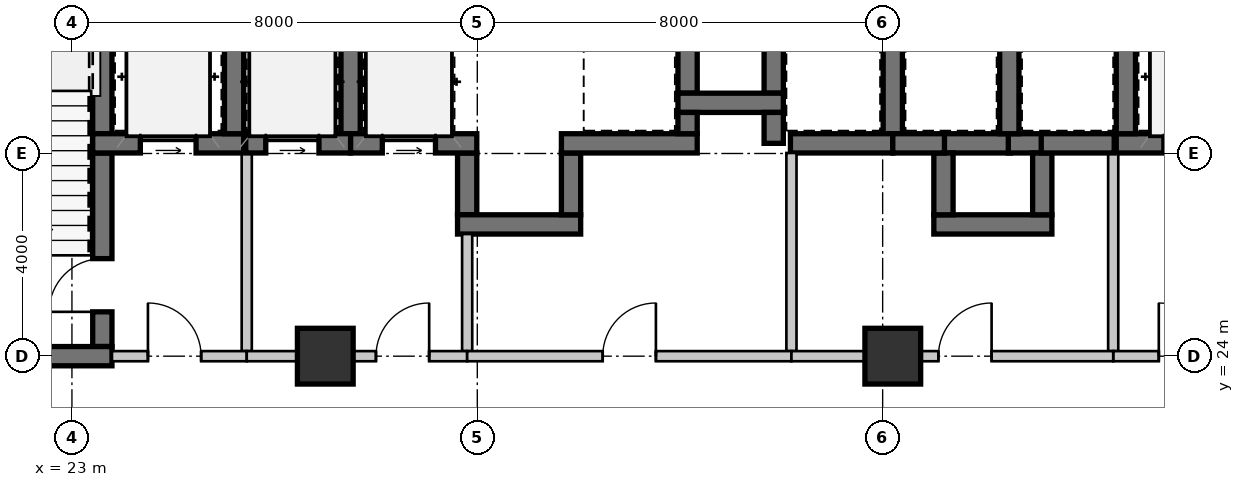
"""IFC4 building model, lengths in metres.
Left out: names, types, materials, properties, quantities, classifications, styles, units other than length and angle.
Written with IfcOpenShell. Run it as: python <this file> out.ifc"""

import sys

from ifc_helpers import new_model, si_unit, direction, frame, frame_2d, origin, origin_2d, place, context, subcontext, project, spatial, rectangle, extrude, source, transform, mapped, element, fill, save


model = new_model("IFC4")
c1 = context("Model", 3, precision=1e-05, world=origin(), true_north=direction((0.0, 1.0)))
c2 = subcontext(c1, "Body", "Model", "MODEL_VIEW")
j1 = project(units=[si_unit("LENGTHUNIT", "METRE"), si_unit("PLANEANGLEUNIT", "RADIAN")], contexts=[c1])
p1 = place(None, origin())
s1 = spatial("IfcSite", under=j1, at=p1, CompositionType="ELEMENT")
p2 = place(p1, origin())
s2 = spatial("IfcBuilding", under=s1, at=p2, CompositionType="ELEMENT")
p3 = place(p2, frame((0.0, 0.0, 4.55)))
s3 = spatial("IfcBuildingStorey", under=s2, at=p3, CompositionType="ELEMENT", Elevation=4.55)
m1 = source(origin(), c2, "Body", "SweptSolid", [
    extrude(rectangle(XDim=1.1, YDim=1.1, at=origin_2d()), origin(), (0.0, 0.0, 1.0), 3.85),
])
for number, where, z_axis, x_axis in (
    (1, (28.0, 24.0, 0.0), (0.0, 0.0, 1.0), (1.0, 0.0, 0.0)),
    (2, (39.2, 24.0, 0.0), (0.0, 0.0, 1.0), (1.0, 0.0, 0.0)),
):
    element("IfcColumn", number, at=place(p3, frame(where, z_axis=z_axis, x_axis=x_axis)), inside=s3, PredefinedType="COLUMN", context=c2, shape_type="MappedRepresentation", body=[
        mapped(m1, transform((0.0, 0.0, 0.0), scale=1.0)),
    ])
m2 = source(origin(), c2, "Body", "SweptSolid", [
    extrude(rectangle(XDim=3.42, YDim=0.38, at=frame_2d((1.71, 0.0))), origin(), (0.0, 0.0, 1.0), 3.59),
])
p4 = place(p3, frame((23.6, 28.39, 0.0), z_axis=(0.0, 0.0, 1.0), x_axis=(0.0, 1.0, 0.0)))
e3 = element("IfcWall", 3, at=p4, inside=s3, PredefinedType="SHEAR", context=c2, shape_type="MappedRepresentation", body=[
    mapped(m2, transform((0.0, 0.0, 0.0), scale=1.0)),
])
m3 = source(origin(), c2, "Body", "SweptSolid", [
    extrude(rectangle(XDim=3.82, YDim=0.38, at=frame_2d((1.91, 0.0))), origin(), (0.0, 0.0, 1.0), 3.59),
])
p5 = place(p3, frame((23.6, 24.19, 0.0), z_axis=(0.0, 0.0, 1.0), x_axis=(0.0, 1.0, 0.0)))
e4 = element("IfcWall", 4, at=p5, inside=s3, PredefinedType="SHEAR", context=c2, shape_type="MappedRepresentation", body=[
    mapped(m3, transform((0.0, 0.0, 0.0), scale=1.0)),
])
m4 = source(origin(), c2, "Body", "SweptSolid", [
    extrude(rectangle(XDim=1.05, YDim=2.1, at=frame_2d((0.525, 1.05))), frame((0.0, 0.2, 0.0), z_axis=(0.0, -1.0, 0.0), x_axis=(1.0, 0.0, 0.0)), (0.0, 0.0, 1.0), 0.4),
])
p6 = place(p5, frame((0.685, 0.0, 0.0)))
e5 = element("IfcOpeningElement", 5, at=p6, cuts=e4, PredefinedType="OPENING", context=c2, shape_type="MappedRepresentation", body=[
    mapped(m4, transform((0.0, 0.0, 0.0), scale=1.0)),
])
m5 = source(origin(), c2, "Body", "SweptSolid", [
    extrude(rectangle(XDim=4.98, YDim=0.38, at=frame_2d((2.49, 0.0))), origin(), (0.0, 0.0, 1.0), 3.59),
])
p7 = place(p3, frame((18.81, 24.0, 0.0), z_axis=(0.0, 0.0, 1.0), x_axis=(1.0, 0.0, 0.0)))
e6 = element("IfcWall", 6, at=p7, inside=s3, PredefinedType="SHEAR", context=c2, shape_type="MappedRepresentation", body=[
    mapped(m5, transform((0.0, 0.0, 0.0), scale=1.0)),
])
m6 = source(origin(), c2, "Body", "SweptSolid", [
    extrude(rectangle(XDim=2.98, YDim=0.38, at=frame_2d((1.49, 0.0))), origin(), (0.0, 0.0, 1.0), 3.59),
])
p8 = place(p3, frame((23.41, 28.2, 0.0), z_axis=(0.0, 0.0, 1.0), x_axis=(1.0, 0.0, 0.0)))
e7 = element("IfcWall", 7, at=p8, inside=s3, PredefinedType="SHEAR", context=c2, shape_type="MappedRepresentation", body=[
    mapped(m6, transform((0.0, 0.0, 0.0), scale=1.0)),
])
m7 = source(origin(), c2, "Body", "SweptSolid", [
    extrude(rectangle(XDim=1.1, YDim=2.15, at=frame_2d((0.55, 1.075))), frame((0.0, 0.2, 0.0), z_axis=(0.0, -1.0, 0.0), x_axis=(1.0, 0.0, 0.0)), (0.0, 0.0, 1.0), 0.4),
])
p9 = place(p8, frame((0.94, 0.0, 0.0)))
e8 = element("IfcOpeningElement", 8, at=p9, cuts=e7, PredefinedType="OPENING", context=c2, shape_type="MappedRepresentation", body=[
    mapped(m7, transform((0.0, 0.0, 0.0), scale=1.0)),
])
p10 = place(p3, frame((26.2, 28.39, 0.0), z_axis=(0.0, 0.0, 1.0), x_axis=(0.0, 1.0, 0.0)))
e9 = element("IfcWall", 9, at=p10, inside=s3, PredefinedType="SHEAR", context=c2, shape_type="MappedRepresentation", body=[
    mapped(m2, transform((0.0, 0.0, 0.0), scale=1.0)),
])
m8 = source(origin(), c2, "Body", "SweptSolid", [
    extrude(rectangle(XDim=3.91, YDim=0.2, at=frame_2d((1.955, 0.0))), origin(), (0.0, 0.0, 1.0), 3.59),
])
p11 = place(p3, frame((26.45, 24.1, 0.0), z_axis=(0.0, 0.0, 1.0), x_axis=(0.0, 1.0, 0.0)))
e10 = element("IfcWall", 10, at=p11, inside=s3, PredefinedType="SOLIDWALL", context=c2, shape_type="MappedRepresentation", body=[
    mapped(m8, transform((0.0, 0.0, 0.0), scale=1.0)),
])
m9 = source(origin(), c2, "Body", "SweptSolid", [
    extrude(rectangle(XDim=2.66, YDim=0.2, at=frame_2d((1.33, 0.0))), origin(), (0.0, 0.0, 1.0), 3.13),
])
p12 = place(p3, frame((23.79, 24.0, 0.0), z_axis=(0.0, 0.0, 1.0), x_axis=(1.0, 0.0, 0.0)))
e11 = element("IfcWall", 11, at=p12, inside=s3, PredefinedType="SOLIDWALL", context=c2, shape_type="MappedRepresentation", body=[
    mapped(m9, transform((0.0, 0.0, 0.0), scale=1.0)),
])
m10 = source(origin(), c2, "Body", "SweptSolid", [
    extrude(rectangle(XDim=1.05, YDim=2.1, at=frame_2d((0.525, 1.05))), frame((0.0, 0.11, 0.0), z_axis=(0.0, -1.0, 0.0), x_axis=(1.0, 0.0, 0.0)), (0.0, 0.0, 1.0), 0.22),
])
p13 = place(p12, frame((0.71, 0.0, 0.0)))
e12 = element("IfcOpeningElement", 12, at=p13, cuts=e11, PredefinedType="OPENING", context=c2, shape_type="MappedRepresentation", body=[
    mapped(m10, transform((0.0, 0.0, 0.0), scale=1.0)),
])
p14 = place(p3, frame((43.61, 28.2, 0.0), z_axis=(0.0, 0.0, 1.0), x_axis=(1.0, 0.0, 0.0)))
e13 = element("IfcWall", 13, at=p14, inside=s3, PredefinedType="SHEAR", context=c2, shape_type="MappedRepresentation", body=[
    mapped(m6, transform((0.0, 0.0, 0.0), scale=1.0)),
])
p15 = place(p14, frame((0.94, 0.0, 0.0)))
e14 = element("IfcOpeningElement", 14, at=p15, cuts=e13, PredefinedType="OPENING", context=c2, shape_type="MappedRepresentation", body=[
    mapped(m7, transform((0.0, 0.0, 0.0), scale=1.0)),
])
p16 = place(p3, frame((43.8, 31.81, 0.0), z_axis=(0.0, 0.0, 1.0), x_axis=(0.0, -1.0, 0.0)))
e15 = element("IfcWall", 15, at=p16, inside=s3, PredefinedType="SHEAR", context=c2, shape_type="MappedRepresentation", body=[
    mapped(m2, transform((0.0, 0.0, 0.0), scale=1.0)),
])
p17 = place(p3, frame((43.55, 28.01, 0.0), z_axis=(0.0, 0.0, 1.0), x_axis=(0.0, -1.0, 0.0)))
e16 = element("IfcWall", 16, at=p17, inside=s3, PredefinedType="SOLIDWALL", context=c2, shape_type="MappedRepresentation", body=[
    mapped(m8, transform((0.0, 0.0, 0.0), scale=1.0)),
])
m11 = source(origin(), c2, "Body", "SweptSolid", [
    extrude(rectangle(XDim=2.66, YDim=0.2, at=frame_2d((1.33, 0.0))), origin(), (0.0, 0.0, 1.0), 3.057),
])
p18 = place(p3, frame((43.55, 24.0, 0.0), z_axis=(0.0, 0.0, 1.0), x_axis=(1.0, 0.0, 0.0)))
e17 = element("IfcWall", 17, at=p18, inside=s3, PredefinedType="SOLIDWALL", context=c2, shape_type="MappedRepresentation", body=[
    mapped(m11, transform((0.0, 0.0, 0.0), scale=1.0)),
])
p19 = place(p18, frame((0.9, 0.0, 0.0)))
e18 = element("IfcOpeningElement", 18, at=p19, cuts=e17, PredefinedType="OPENING", context=c2, shape_type="MappedRepresentation", body=[
    mapped(m10, transform((0.0, 0.0, 0.0), scale=1.0)),
])
m12 = source(origin(), c2, "Body", "SweptSolid", [
    extrude(rectangle(XDim=1.12, YDim=0.38, at=frame_2d((0.56, 0.0))), origin(), (0.0, 0.0, 1.0), 3.59),
])
for number, where, z_axis, x_axis in (
    (19, (35.15, 30.31, 0.0), (0.0, 0.0, 1.0), (0.0, -1.0, 0.0)),
    (20, (36.85, 29.19, 0.0), (0.0, 0.0, 1.0), (0.0, 1.0, 0.0)),
):
    element("IfcWall", number, at=place(p3, frame(where, z_axis=z_axis, x_axis=x_axis)), inside=s3, PredefinedType="SHEAR", context=c2, shape_type="MappedRepresentation", body=[
        mapped(m12, transform((0.0, 0.0, 0.0), scale=1.0)),
    ])
m13 = source(origin(), c2, "Body", "SweptSolid", [
    extrude(rectangle(XDim=2.08, YDim=0.38, at=frame_2d((1.04, 0.0))), origin(), (0.0, 0.0, 1.0), 3.59),
])
p20 = place(p3, frame((34.96, 29.0, 0.0), z_axis=(0.0, 0.0, 1.0), x_axis=(1.0, 0.0, 0.0)))
e21 = element("IfcWall", 21, at=p20, inside=s3, PredefinedType="SHEAR", context=c2, shape_type="MappedRepresentation", body=[
    mapped(m13, transform((0.0, 0.0, 0.0), scale=1.0)),
])
m14 = source(origin(), c2, "Body", "SweptSolid", [
    extrude(rectangle(XDim=1.22, YDim=0.38, at=frame_2d((0.61, 0.0))), origin(), (0.0, 0.0, 1.0), 3.59),
])
p21 = place(p3, frame((30.8, 28.01, 0.0), z_axis=(0.0, 0.0, 1.0), x_axis=(0.0, -1.0, 0.0)))
e22 = element("IfcWall", 22, at=p21, inside=s3, PredefinedType="SHEAR", context=c2, shape_type="MappedRepresentation", body=[
    mapped(m14, transform((0.0, 0.0, 0.0), scale=1.0)),
])
m15 = source(origin(), c2, "Body", "SweptSolid", [
    extrude(rectangle(XDim=2.43, YDim=0.38, at=frame_2d((1.215, 0.0))), origin(), (0.0, 0.0, 1.0), 3.59),
])
p22 = place(p3, frame((30.61, 26.6, 0.0), z_axis=(0.0, 0.0, 1.0), x_axis=(1.0, 0.0, 0.0)))
e23 = element("IfcWall", 23, at=p22, inside=s3, PredefinedType="SHEAR", context=c2, shape_type="MappedRepresentation", body=[
    mapped(m15, transform((0.0, 0.0, 0.0), scale=1.0)),
])
p23 = place(p3, frame((32.85, 26.79, 0.0), z_axis=(0.0, 0.0, 1.0), x_axis=(0.0, 1.0, 0.0)))
e24 = element("IfcWall", 24, at=p23, inside=s3, PredefinedType="SHEAR", context=c2, shape_type="MappedRepresentation", body=[
    mapped(m14, transform((0.0, 0.0, 0.0), scale=1.0)),
])
m16 = source(origin(), c2, "Body", "SweptSolid", [
    extrude(rectangle(XDim=1.32, YDim=0.38, at=frame_2d((0.66, 0.0))), origin(), (0.0, 0.0, 1.0), 3.59),
])
p24 = place(p3, frame((41.52, 28.2, 0.0), z_axis=(0.0, 0.0, 1.0), x_axis=(-1.0, 0.0, 0.0)))
e25 = element("IfcWall", 25, at=p24, inside=s3, PredefinedType="SHEAR", context=c2, shape_type="MappedRepresentation", body=[
    mapped(m16, transform((0.0, 0.0, 0.0), scale=1.0)),
])
m17 = source(origin(), c2, "Body", "SweptSolid", [
    extrude(rectangle(XDim=0.67, YDim=0.38, at=frame_2d((0.335, 0.0))), origin(), (0.0, 0.0, 1.0), 3.59),
])
p25 = place(p3, frame((42.15, 28.2, 0.0), z_axis=(0.0, 0.0, 1.0), x_axis=(-1.0, 0.0, 0.0)))
e26 = element("IfcWall", 26, at=p25, inside=s3, PredefinedType="SHEAR", context=c2, shape_type="MappedRepresentation", body=[
    mapped(m17, transform((0.0, 0.0, 0.0), scale=1.0)),
])
m18 = source(origin(), c2, "Body", "SweptSolid", [
    extrude(rectangle(XDim=2.33, YDim=0.38, at=frame_2d((1.165, 0.0))), origin(), (0.0, 0.0, 1.0), 3.59),
])
p26 = place(p3, frame((40.01, 26.6, 0.0), z_axis=(0.0, 0.0, 1.0), x_axis=(1.0, 0.0, 0.0)))
e27 = element("IfcWall", 27, at=p26, inside=s3, PredefinedType="SHEAR", context=c2, shape_type="MappedRepresentation", body=[
    mapped(m18, transform((0.0, 0.0, 0.0), scale=1.0)),
])
for number, where, z_axis, x_axis in (
    (28, (40.2, 28.01, 0.0), (0.0, 0.0, 1.0), (0.0, -1.0, 0.0)),
    (29, (42.15, 26.79, 0.0), (0.0, 0.0, 1.0), (0.0, 1.0, 0.0)),
):
    element("IfcWall", number, at=place(p3, frame(where, z_axis=z_axis, x_axis=x_axis)), inside=s3, PredefinedType="SHEAR", context=c2, shape_type="MappedRepresentation", body=[
        mapped(m14, transform((0.0, 0.0, 0.0), scale=1.0)),
    ])
p27 = place(p3, frame((28.5, 28.39, 0.0), z_axis=(0.0, 0.0, 1.0), x_axis=(0.0, 1.0, 0.0)))
e30 = element("IfcWall", 30, at=p27, inside=s3, PredefinedType="SHEAR", context=c2, shape_type="MappedRepresentation", body=[
    mapped(m2, transform((0.0, 0.0, 0.0), scale=1.0)),
])
m19 = source(origin(), c2, "Body", "SweptSolid", [
    extrude(rectangle(XDim=2.07, YDim=0.38, at=frame_2d((1.035, 0.0))), origin(), (0.0, 0.0, 1.0), 3.59),
])
p28 = place(p3, frame((26.43, 28.2, 0.0), z_axis=(0.0, 0.0, 1.0), x_axis=(1.0, 0.0, 0.0)))
e31 = element("IfcWall", 31, at=p28, inside=s3, PredefinedType="SHEAR", context=c2, shape_type="MappedRepresentation", body=[
    mapped(m19, transform((0.0, 0.0, 0.0), scale=1.0)),
])
m20 = source(origin(), c2, "Body", "SweptSolid", [
    extrude(rectangle(XDim=1.05, YDim=2.15, at=frame_2d((0.525, 1.075))), frame((0.0, 0.2, 0.0), z_axis=(0.0, -1.0, 0.0), x_axis=(1.0, 0.0, 0.0)), (0.0, 0.0, 1.0), 0.4),
])
p29 = place(p28, frame((0.395, 0.0, 0.0)))
e32 = element("IfcOpeningElement", 32, at=p29, cuts=e31, PredefinedType="OPENING", context=c2, shape_type="MappedRepresentation", body=[
    mapped(m20, transform((0.0, 0.0, 0.0), scale=1.0)),
])
m21 = source(origin(), c2, "Body", "SweptSolid", [
    extrude(rectangle(XDim=2.49, YDim=0.38, at=frame_2d((1.245, 0.0))), origin(), (0.0, 0.0, 1.0), 3.59),
])
p30 = place(p3, frame((28.5, 28.2, 0.0), z_axis=(0.0, 0.0, 1.0), x_axis=(1.0, 0.0, 0.0)))
e33 = element("IfcWall", 33, at=p30, inside=s3, PredefinedType="SHEAR", context=c2, shape_type="MappedRepresentation", body=[
    mapped(m21, transform((0.0, 0.0, 0.0), scale=1.0)),
])
p31 = place(p30, frame((0.625, 0.0, 0.0)))
e34 = element("IfcOpeningElement", 34, at=p31, cuts=e33, PredefinedType="OPENING", context=c2, shape_type="MappedRepresentation", body=[
    mapped(m20, transform((0.0, 0.0, 0.0), scale=1.0)),
])
m22 = source(origin(), c2, "Body", "SweptSolid", [
    extrude(rectangle(XDim=2.31, YDim=0.2, at=frame_2d((1.155, 0.0))), origin(), (0.0, 0.0, 1.0), 3.59),
])
p32 = place(p3, frame((30.8, 26.41, 0.0), z_axis=(0.0, 0.0, 1.0), x_axis=(0.0, -1.0, 0.0)))
e35 = element("IfcWall", 35, at=p32, inside=s3, PredefinedType="SOLIDWALL", context=c2, shape_type="MappedRepresentation", body=[
    mapped(m22, transform((0.0, 0.0, 0.0), scale=1.0)),
])
m23 = source(origin(), c2, "Body", "SweptSolid", [
    extrude(rectangle(XDim=4.35, YDim=0.2, at=frame_2d((2.175, 0.0))), origin(), (0.0, 0.0, 1.0), 3.13),
])
p33 = place(p3, frame((30.8, 24.0, 0.0), z_axis=(0.0, 0.0, 1.0), x_axis=(-1.0, 0.0, 0.0)))
e36 = element("IfcWall", 36, at=p33, inside=s3, PredefinedType="SOLIDWALL", context=c2, shape_type="MappedRepresentation", body=[
    mapped(m23, transform((0.0, 0.0, 0.0), scale=1.0)),
])
p34 = place(p33, frame((0.75, 0.0, 0.0)))
e37 = element("IfcOpeningElement", 37, at=p34, cuts=e36, PredefinedType="OPENING", context=c2, shape_type="MappedRepresentation", body=[
    mapped(m10, transform((0.0, 0.0, 0.0), scale=1.0)),
])
m24 = source(origin(), c2, "Body", "SweptSolid", [
    extrude(rectangle(XDim=2.68, YDim=0.38, at=frame_2d((1.34, 0.0))), origin(), (0.0, 0.0, 1.0), 3.59),
])
p35 = place(p3, frame((32.66, 28.2, 0.0), z_axis=(0.0, 0.0, 1.0), x_axis=(1.0, 0.0, 0.0)))
e38 = element("IfcWall", 38, at=p35, inside=s3, PredefinedType="SHEAR", context=c2, shape_type="MappedRepresentation", body=[
    mapped(m24, transform((0.0, 0.0, 0.0), scale=1.0)),
])
m25 = source(origin(), c2, "Body", "SweptSolid", [
    extrude(rectangle(XDim=0.42, YDim=0.38, at=frame_2d((0.21, 0.0))), origin(), (0.0, 0.0, 1.0), 3.59),
])
p36 = place(p3, frame((35.15, 28.39, 0.0), z_axis=(0.0, 0.0, 1.0), x_axis=(0.0, 1.0, 0.0)))
e39 = element("IfcWall", 39, at=p36, inside=s3, PredefinedType="SHEAR", context=c2, shape_type="MappedRepresentation", body=[
    mapped(m25, transform((0.0, 0.0, 0.0), scale=1.0)),
])
p37 = place(p3, frame((39.2, 28.39, 0.0), z_axis=(0.0, 0.0, 1.0), x_axis=(0.0, 1.0, 0.0)))
e40 = element("IfcWall", 40, at=p37, inside=s3, PredefinedType="SHEAR", context=c2, shape_type="MappedRepresentation", body=[
    mapped(m2, transform((0.0, 0.0, 0.0), scale=1.0)),
])
m26 = source(origin(), c2, "Body", "SweptSolid", [
    extrude(rectangle(XDim=0.61, YDim=0.38, at=frame_2d((0.305, 0.0))), origin(), (0.0, 0.0, 1.0), 3.59),
])
p38 = place(p3, frame((36.85, 28.81, 0.0), z_axis=(0.0, 0.0, 1.0), x_axis=(0.0, -1.0, 0.0)))
e41 = element("IfcWall", 41, at=p38, inside=s3, PredefinedType="SHEAR", context=c2, shape_type="MappedRepresentation", body=[
    mapped(m26, transform((0.0, 0.0, 0.0), scale=1.0)),
])
m27 = source(origin(), c2, "Body", "SweptSolid", [
    extrude(rectangle(XDim=2.02, YDim=0.38, at=frame_2d((1.01, 0.0))), origin(), (0.0, 0.0, 1.0), 3.59),
])
p39 = place(p3, frame((37.18, 28.2, 0.0), z_axis=(0.0, 0.0, 1.0), x_axis=(1.0, 0.0, 0.0)))
e42 = element("IfcWall", 42, at=p39, inside=s3, PredefinedType="SHEAR", context=c2, shape_type="MappedRepresentation", body=[
    mapped(m27, transform((0.0, 0.0, 0.0), scale=1.0)),
])
p40 = place(p3, frame((41.5, 28.39, 0.0), z_axis=(0.0, 0.0, 1.0), x_axis=(0.0, 1.0, 0.0)))
e43 = element("IfcWall", 43, at=p40, inside=s3, PredefinedType="SHEAR", context=c2, shape_type="MappedRepresentation", body=[
    mapped(m2, transform((0.0, 0.0, 0.0), scale=1.0)),
])
m28 = source(origin(), c2, "Body", "SweptSolid", [
    extrude(rectangle(XDim=1.02, YDim=0.38, at=frame_2d((0.51, 0.0))), origin(), (0.0, 0.0, 1.0), 3.59),
])
p41 = place(p3, frame((39.2, 28.2, 0.0), z_axis=(0.0, 0.0, 1.0), x_axis=(1.0, 0.0, 0.0)))
e44 = element("IfcWall", 44, at=p41, inside=s3, PredefinedType="SHEAR", context=c2, shape_type="MappedRepresentation", body=[
    mapped(m28, transform((0.0, 0.0, 0.0), scale=1.0)),
])
m29 = source(origin(), c2, "Body", "SweptSolid", [
    extrude(rectangle(XDim=1.44, YDim=0.38, at=frame_2d((0.72, 0.0))), origin(), (0.0, 0.0, 1.0), 3.59),
])
p42 = place(p3, frame((42.13, 28.2, 0.0), z_axis=(0.0, 0.0, 1.0), x_axis=(1.0, 0.0, 0.0)))
e45 = element("IfcWall", 45, at=p42, inside=s3, PredefinedType="SHEAR", context=c2, shape_type="MappedRepresentation", body=[
    mapped(m29, transform((0.0, 0.0, 0.0), scale=1.0)),
])
p43 = place(p3, frame((37.2, 28.01, 0.0), z_axis=(0.0, 0.0, 1.0), x_axis=(0.0, -1.0, 0.0)))
e46 = element("IfcWall", 46, at=p43, inside=s3, PredefinedType="SOLIDWALL", context=c2, shape_type="MappedRepresentation", body=[
    mapped(m8, transform((0.0, 0.0, 0.0), scale=1.0)),
])
m30 = source(origin(), c2, "Body", "SweptSolid", [
    extrude(rectangle(XDim=6.4, YDim=0.2, at=frame_2d((3.2, 0.0))), origin(), (0.0, 0.0, 1.0), 3.13),
])
p44 = place(p3, frame((37.2, 24.0, 0.0), z_axis=(0.0, 0.0, 1.0), x_axis=(-1.0, 0.0, 0.0)))
e47 = element("IfcWall", 47, at=p44, inside=s3, PredefinedType="SOLIDWALL", context=c2, shape_type="MappedRepresentation", body=[
    mapped(m30, transform((0.0, 0.0, 0.0), scale=1.0)),
])
p45 = place(p44, frame((2.675, 0.0, 0.0)))
e48 = element("IfcOpeningElement", 48, at=p45, cuts=e47, PredefinedType="OPENING", context=c2, shape_type="MappedRepresentation", body=[
    mapped(m10, transform((0.0, 0.0, 0.0), scale=1.0)),
])
m31 = source(origin(), c2, "Body", "SweptSolid", [
    extrude(rectangle(XDim=4.35, YDim=0.2, at=frame_2d((2.175, 0.0))), origin(), (0.0, 0.0, 1.0), 3.057),
])
p46 = place(p3, frame((43.55, 24.0, 0.0), z_axis=(0.0, 0.0, 1.0), x_axis=(-1.0, 0.0, 0.0)))
e49 = element("IfcWall", 49, at=p46, inside=s3, PredefinedType="SOLIDWALL", context=c2, shape_type="MappedRepresentation", body=[
    mapped(m31, transform((0.0, 0.0, 0.0), scale=1.0)),
])
p47 = place(p46, frame((2.4, 0.0, 0.0)))
e50 = element("IfcOpeningElement", 50, at=p47, cuts=e49, PredefinedType="OPENING", context=c2, shape_type="MappedRepresentation", body=[
    mapped(m10, transform((0.0, 0.0, 0.0), scale=1.0)),
])
m32 = source(origin(), c2, "Body", "SweptSolid", [
    extrude(rectangle(XDim=2.0, YDim=0.2, at=frame_2d((1.0, 0.0))), origin(), (0.0, 0.0, 1.0), 3.13),
])
p48 = place(p3, frame((39.2, 24.0, 0.0), z_axis=(0.0, 0.0, 1.0), x_axis=(-1.0, 0.0, 0.0)))
e51 = element("IfcWall", 51, at=p48, inside=s3, PredefinedType="SOLIDWALL", context=c2, shape_type="MappedRepresentation", body=[
    mapped(m32, transform((0.0, 0.0, 0.0), scale=1.0)),
])
m33 = source(origin(), c2, "Body", "SweptSolid", [
    extrude(rectangle(XDim=1.05, YDim=2.1, at=frame_2d((0.525, 1.05))), frame((0.0, 0.025, 0.0), z_axis=(0.0, -1.0, 0.0), x_axis=(1.0, 0.0, 0.0)), (0.0, 0.0, 1.0), 0.05),
])
p49 = place(p6, origin())
e52 = element("IfcDoor", 52, at=p49, inside=s3, OperationType="SINGLE_SWING_LEFT", PredefinedType="DOOR", context=c2, shape_type="MappedRepresentation", body=[
    mapped(m33, transform((0.0, 0.0, 0.0), scale=1.0)),
])
fill(e5, e52)
m34 = source(origin(), c2, "Body", "SweptSolid", [
    extrude(rectangle(XDim=1.1, YDim=2.15, at=frame_2d((0.55, 1.075))), frame((0.0, 0.025, 0.0), z_axis=(0.0, -1.0, 0.0), x_axis=(1.0, 0.0, 0.0)), (0.0, 0.0, 1.0), 0.05),
])
p50 = place(p9, origin())
e53 = element("IfcDoor", 53, at=p50, inside=s3, OperationType="SLIDING_TO_LEFT", PredefinedType="DOOR", context=c2, shape_type="MappedRepresentation", body=[
    mapped(m34, transform((0.0, 0.0, 0.0), scale=1.0)),
])
fill(e8, e53)
p51 = place(p13, origin())
e54 = element("IfcDoor", 54, at=p51, inside=s3, OperationType="SINGLE_SWING_LEFT", PredefinedType="DOOR", context=c2, shape_type="MappedRepresentation", body=[
    mapped(m33, transform((0.0, 0.0, 0.0), scale=1.0)),
])
fill(e12, e54)
p52 = place(p19, origin())
e55 = element("IfcDoor", 55, at=p52, inside=s3, OperationType="SINGLE_SWING_LEFT", PredefinedType="DOOR", context=c2, shape_type="MappedRepresentation", body=[
    mapped(m33, transform((0.0, 0.0, 0.0), scale=1.0)),
])
fill(e18, e55)
m35 = source(origin(), c2, "Body", "SweptSolid", [
    extrude(rectangle(XDim=1.05, YDim=2.15, at=frame_2d((0.525, 1.075))), frame((0.0, 0.025, 0.0), z_axis=(0.0, -1.0, 0.0), x_axis=(1.0, 0.0, 0.0)), (0.0, 0.0, 1.0), 0.05),
])
p53 = place(p29, origin())
e56 = element("IfcDoor", 56, at=p53, inside=s3, OperationType="SLIDING_TO_LEFT", PredefinedType="DOOR", context=c2, shape_type="MappedRepresentation", body=[
    mapped(m35, transform((0.0, 0.0, 0.0), scale=1.0)),
])
fill(e32, e56)
p54 = place(p31, origin())
e57 = element("IfcDoor", 57, at=p54, inside=s3, OperationType="SLIDING_TO_LEFT", PredefinedType="DOOR", context=c2, shape_type="MappedRepresentation", body=[
    mapped(m35, transform((0.0, 0.0, 0.0), scale=1.0)),
])
fill(e34, e57)
p55 = place(p34, frame((1.05, 0.0, 0.0), z_axis=(0.0, 0.0, 1.0), x_axis=(-1.0, 0.0, 0.0)))
e58 = element("IfcDoor", 58, at=p55, inside=s3, OperationType="SINGLE_SWING_RIGHT", PredefinedType="DOOR", context=c2, shape_type="MappedRepresentation", body=[
    mapped(m33, transform((0.0, 0.0, 0.0), scale=1.0)),
])
fill(e37, e58)
p56 = place(p45, frame((1.05, 0.0, 0.0), z_axis=(0.0, 0.0, 1.0), x_axis=(-1.0, 0.0, 0.0)))
e59 = element("IfcDoor", 59, at=p56, inside=s3, OperationType="SINGLE_SWING_RIGHT", PredefinedType="DOOR", context=c2, shape_type="MappedRepresentation", body=[
    mapped(m33, transform((0.0, 0.0, 0.0), scale=1.0)),
])
fill(e48, e59)
p57 = place(p47, frame((1.05, 0.0, 0.0), z_axis=(0.0, 0.0, 1.0), x_axis=(-1.0, 0.0, 0.0)))
e60 = element("IfcDoor", 60, at=p57, inside=s3, OperationType="SINGLE_SWING_RIGHT", PredefinedType="DOOR", context=c2, shape_type="MappedRepresentation", body=[
    mapped(m33, transform((0.0, 0.0, 0.0), scale=1.0)),
])
fill(e50, e60)
save(model, sys.argv[1])
